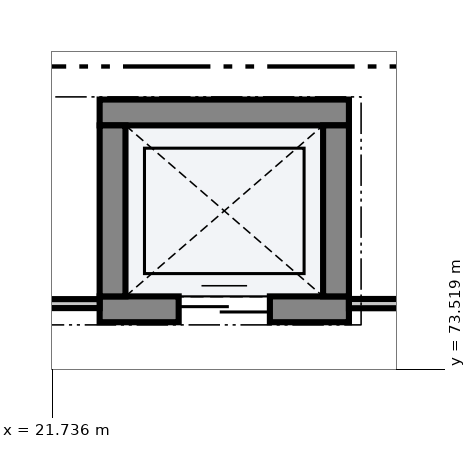
"""IFC4 building model, lengths in metres.
Left out: names, types, materials, properties, quantities, classifications, styles, units other than length and angle.
Written with IfcOpenShell. Run it as: python <this file> out.ifc"""

import sys

from ifc_helpers import new_model, si_unit, direction, frame, frame_2d, origin, place, context, subcontext, project, spatial, rectangle, extrude, element, fill, save


model = new_model("IFC4")
c1 = context("Model", 3, precision=1e-05, world=origin(), true_north=direction((0.0, 1.0)))
c2 = subcontext(c1, "Body", "Model", "MODEL_VIEW")
j1 = project(units=[si_unit("LENGTHUNIT", "METRE"), si_unit("PLANEANGLEUNIT", "RADIAN")], contexts=[c1])
p1 = place(None, origin())
s1 = spatial("IfcSite", under=j1, at=p1, CompositionType="ELEMENT")
p2 = place(p1, origin())
s2 = spatial("IfcBuilding", under=s1, at=p2, CompositionType="ELEMENT")
p3 = place(p2, frame((0.0, 0.0, 19.8)))
s3 = spatial("IfcBuildingStorey", under=s2, at=p3, CompositionType="ELEMENT", Elevation=19.8)
p4 = place(p3, frame((22.36, 74.305, 0.0), z_axis=(0.0, 0.0, 1.0), x_axis=(1.0, 0.0, 0.0)))
e1 = element("IfcWall", 1, at=p4, inside=s3, PredefinedType="SHEAR", context=c2, shape_type="SweptSolid", body=[
    extrude(rectangle(XDim=3.28, YDim=0.34, at=frame_2d((1.64, 0.0))), origin(), (0.0, 0.0, 1.0), 4.48),
])
p5 = place(p4, frame((1.04, 0.0, 0.0)))
e2 = element("IfcOpeningElement", 2, at=p5, cuts=e1, PredefinedType="OPENING", context=c2, shape_type="SweptSolid", body=[
    extrude(rectangle(XDim=1.2, YDim=2.2, at=frame_2d((0.6, 1.1))), frame((0.0, 0.182, 0.0), z_axis=(0.0, -1.0, 0.0), x_axis=(1.0, 0.0, 0.0)), (0.0, 0.0, 1.0), 0.364),
])
p6 = place(p3, frame((22.36, 76.895, 0.0), z_axis=(0.0, 0.0, 1.0), x_axis=(1.0, 0.0, 0.0)))
e3 = element("IfcWall", 3, at=p6, inside=s3, PredefinedType="SHEAR", context=c2, shape_type="SweptSolid", body=[
    extrude(rectangle(XDim=3.28, YDim=0.34, at=frame_2d((1.64, 0.0))), origin(), (0.0, 0.0, 1.0), 4.48),
])
for number, where, z_axis, x_axis in (
    (4, (22.53, 74.475, 0.0), (0.0, 0.0, 1.0), (0.0, 1.0, 0.0)),
    (5, (25.47, 74.475, 0.0), (0.0, 0.0, 1.0), (0.0, 1.0, 0.0)),
):
    element("IfcWall", number, at=place(p3, frame(where, z_axis=z_axis, x_axis=x_axis)), inside=s3, PredefinedType="SHEAR", context=c2, shape_type="SweptSolid", body=[
        extrude(rectangle(XDim=2.25, YDim=0.34, at=frame_2d((1.125, 0.0))), origin(), (0.0, 0.0, 1.0), 4.48),
    ])
p7 = place(p3, frame((46.55, 74.38, 0.0), z_axis=(0.0, 0.0, 1.0), x_axis=(-1.0, 0.0, 0.0)))
e6 = element("IfcWall", 6, at=p7, inside=s3, PredefinedType="PARTITIONING", context=c2, shape_type="SweptSolid", body=[
    extrude(rectangle(XDim=20.91, YDim=0.122, at=frame_2d((10.455, 0.0))), origin(), (0.0, 0.0, 1.0), 3.42),
])
p8 = place(p7, frame((9.252, 0.0, 0.0)))
e7 = element("IfcOpeningElement", 7, at=p8, cuts=e6, PredefinedType="OPENING", context=c2, shape_type="SweptSolid", body=[
    extrude(rectangle(XDim=2.0, YDim=2.4, at=frame_2d((1.0, 1.2))), frame((0.0, 0.073, 0.0), z_axis=(0.0, -1.0, 0.0), x_axis=(1.0, 0.0, 0.0)), (0.0, 0.0, 1.0), 0.146),
])
p9 = place(p3, frame((22.36, 74.38, 0.0), z_axis=(0.0, 0.0, 1.0), x_axis=(-1.0, 0.0, 0.0)))
e8 = element("IfcWall", 8, at=p9, inside=s3, PredefinedType="PARTITIONING", context=c2, shape_type="SweptSolid", body=[
    extrude(rectangle(XDim=6.32, YDim=0.118, at=frame_2d((3.16, 0.0))), origin(), (0.0, 0.0, 1.0), 3.42),
])
p10 = place(p5, origin())
e9 = element("IfcDoor", 9, at=p10, inside=s3, OperationType="DOUBLE_DOOR_SLIDING", PredefinedType="DOOR", context=c2, shape_type="SweptSolid", body=[
    extrude(rectangle(XDim=1.2, YDim=2.2, at=frame_2d((0.6, 1.1))), frame((0.0, 0.025, 0.0), z_axis=(0.0, -1.0, 0.0), x_axis=(1.0, 0.0, 0.0)), (0.0, 0.0, 1.0), 0.05),
])
fill(e2, e9)
save(model, sys.argv[1])
